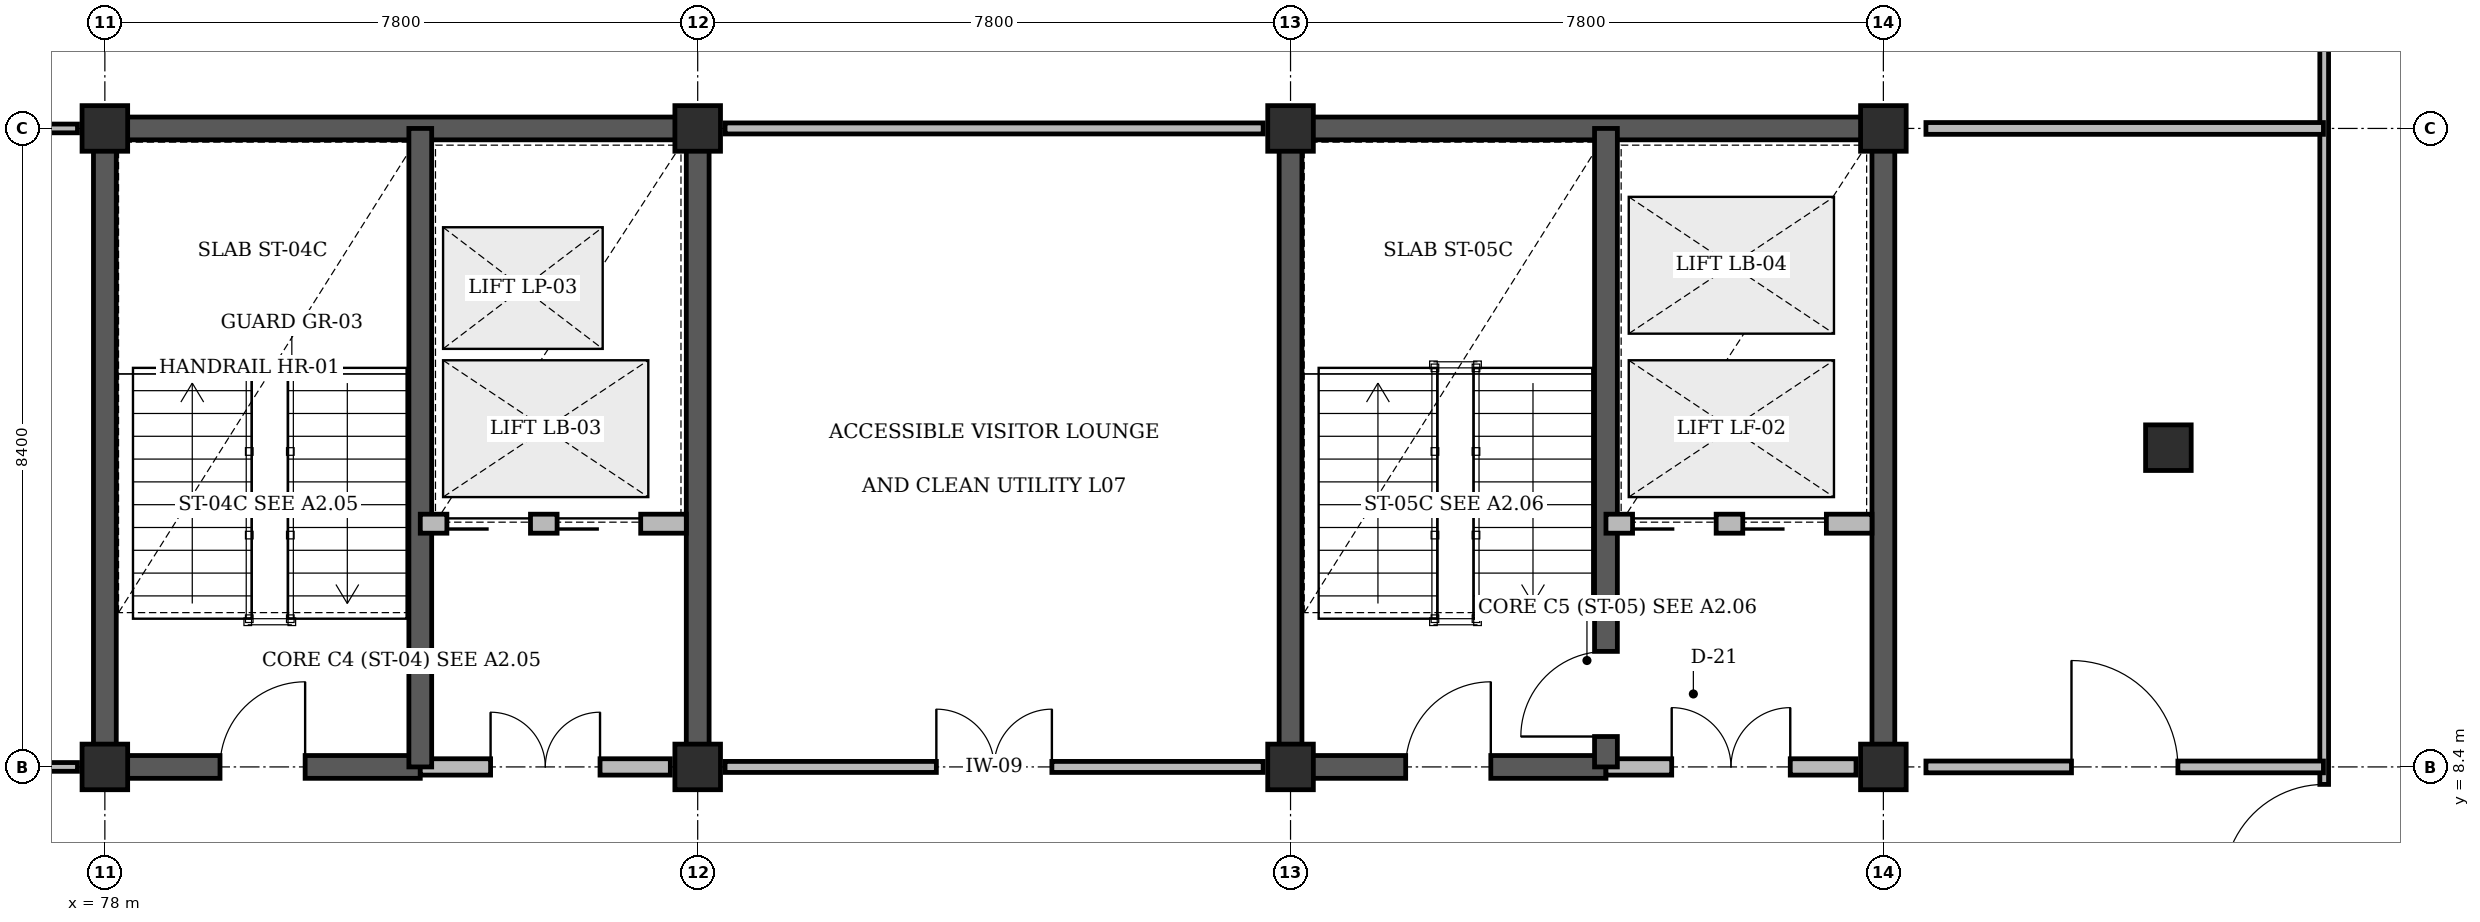
"""IFC4 building model, lengths in metres.
Left out: names, types, materials, properties, quantities, classifications, styles, units other than length and angle.
Written with IfcOpenShell. Run it as: python <this file> out.ifc"""

import sys

from ifc_helpers import new_model, si_unit, direction, frame, frame_2d, origin, origin_2d, place, context, subcontext, project, spatial, rectangle, circle, extrude, element, fill, save


model = new_model("IFC4")
c1 = context("Model", 3, precision=1e-05, world=origin(), true_north=direction((0.0, 1.0)))
c2 = subcontext(c1, "Body", "Model", "MODEL_VIEW")
j1 = project(units=[si_unit("LENGTHUNIT", "METRE"), si_unit("PLANEANGLEUNIT", "RADIAN")], contexts=[c1])
p1 = place(None, origin())
s1 = spatial("IfcSite", under=j1, at=p1, CompositionType="ELEMENT")
p2 = place(p1, origin())
s2 = spatial("IfcBuilding", under=s1, at=p2, CompositionType="ELEMENT")
p3 = place(p2, frame((0.0, 0.0, 30.6)))
s3 = spatial("IfcBuildingStorey", under=s2, at=p3, CompositionType="ELEMENT", Elevation=30.6)
p4 = place(p3, frame((77.85, 16.8, 0.0), z_axis=(0.0, 0.0, 1.0), x_axis=(1.0, 0.0, 0.0)))
e1 = element("IfcWall", 1, at=p4, inside=s3, PredefinedType="SHEAR", context=c2, shape_type="SweptSolid", body=[
    extrude(rectangle(XDim=8.1, YDim=0.3, at=frame_2d((4.05, 0.0))), origin(), (0.0, 0.0, 1.0), 3.92),
])
for number, where, z_axis, x_axis in (
    (2, (78.0, 8.4, 0.0), (0.0, 0.0, 1.0), (0.0, 1.0, 0.0)),
    (3, (85.8, 8.4, 0.0), (0.0, 0.0, 1.0), (0.0, 1.0, 0.0)),
):
    element("IfcWall", number, at=place(p3, frame(where, z_axis=z_axis, x_axis=x_axis)), inside=s3, PredefinedType="SHEAR", context=c2, shape_type="SweptSolid", body=[
        extrude(rectangle(XDim=8.4, YDim=0.3, at=frame_2d((4.2, 0.0))), origin(), (0.0, 0.0, 1.0), 3.92),
    ])
p5 = place(p3, frame((93.45, 16.8, 0.0), z_axis=(0.0, 0.0, 1.0), x_axis=(1.0, 0.0, 0.0)))
e4 = element("IfcWall", 4, at=p5, inside=s3, PredefinedType="SHEAR", context=c2, shape_type="SweptSolid", body=[
    extrude(rectangle(XDim=8.1, YDim=0.3, at=frame_2d((4.05, 0.0))), origin(), (0.0, 0.0, 1.0), 3.92),
])
for number, where, z_axis, x_axis in (
    (5, (93.6, 8.4, 0.0), (0.0, 0.0, 1.0), (0.0, 1.0, 0.0)),
    (6, (101.4, 8.4, 0.0), (0.0, 0.0, 1.0), (0.0, 1.0, 0.0)),
):
    element("IfcWall", number, at=place(p3, frame(where, z_axis=z_axis, x_axis=x_axis)), inside=s3, PredefinedType="SHEAR", context=c2, shape_type="SweptSolid", body=[
        extrude(rectangle(XDim=8.4, YDim=0.3, at=frame_2d((4.2, 0.0))), origin(), (0.0, 0.0, 1.0), 3.92),
    ])
for number, where, z_axis, x_axis in (
    (7, (78.0, 8.4, 0.0), (0.0, 0.0, 1.0), (1.0, 0.0, 0.0)),
    (8, (78.0, 16.8, 0.0), (0.0, 0.0, 1.0), (1.0, 0.0, 0.0)),
    (9, (85.8, 8.4, 0.0), (0.0, 0.0, 1.0), (1.0, 0.0, 0.0)),
    (10, (85.8, 16.8, 0.0), (0.0, 0.0, 1.0), (1.0, 0.0, 0.0)),
    (11, (93.6, 8.4, 0.0), (0.0, 0.0, 1.0), (1.0, 0.0, 0.0)),
    (12, (93.6, 16.8, 0.0), (0.0, 0.0, 1.0), (1.0, 0.0, 0.0)),
    (13, (101.4, 8.4, 0.0), (0.0, 0.0, 1.0), (1.0, 0.0, 0.0)),
    (14, (101.4, 16.8, 0.0), (0.0, 0.0, 1.0), (1.0, 0.0, 0.0)),
):
    element("IfcColumn", number, at=place(p3, frame(where, z_axis=z_axis, x_axis=x_axis)), inside=s3, PredefinedType="COLUMN", context=c2, shape_type="SweptSolid", body=[
        extrude(rectangle(XDim=0.6, YDim=0.6, at=origin_2d()), origin(), (0.0, 0.0, 1.0), 4.2),
    ])
p6 = place(p3, frame((105.15, 12.6, 0.0), z_axis=(0.0, 0.0, 1.0), x_axis=(1.0, 0.0, 0.0)))
e15 = element("IfcColumn", 15, at=p6, inside=s3, PredefinedType="PILASTER", context=c2, shape_type="SweptSolid", body=[
    extrude(circle(Radius=0.3, at=origin_2d()), origin(), (0.0, 0.0, 1.0), 4.2),
])
p7 = place(p3, frame((78.0, 8.4, 0.0), z_axis=(0.0, 0.0, 1.0), x_axis=(1.0, 0.0, 0.0)))
e16 = element("IfcWall", 16, at=p7, inside=s3, PredefinedType="SHEAR", context=c2, shape_type="SweptSolid", body=[
    extrude(rectangle(XDim=4.15, YDim=0.3, at=frame_2d((2.075, 0.0))), origin(), (0.0, 0.0, 1.0), 4.2),
])
p8 = place(p7, frame((1.515, 0.0, 0.0)))
e17 = element("IfcOpeningElement", 17, at=p8, cuts=e16, PredefinedType="OPENING", context=c2, shape_type="SweptSolid", body=[
    extrude(rectangle(XDim=1.12, YDim=2.15, at=frame_2d((0.56, 1.075))), frame((0.0, 0.16, 0.0), z_axis=(0.0, -1.0, 0.0), x_axis=(1.0, 0.0, 0.0)), (0.0, 0.0, 1.0), 0.32),
])
p9 = place(p3, frame((82.15, 8.4, 0.0), z_axis=(0.0, 0.0, 1.0), x_axis=(1.0, 0.0, 0.0)))
e18 = element("IfcWall", 18, at=p9, inside=s3, PredefinedType="STANDARD", context=c2, shape_type="SweptSolid", body=[
    extrude(rectangle(XDim=3.29, YDim=0.215, at=frame_2d((1.645, 0.0))), origin(), (0.0, 0.0, 1.0), 3.305),
])
p10 = place(p9, frame((0.925, 0.0, 0.0)))
e19 = element("IfcOpeningElement", 19, at=p10, cuts=e18, PredefinedType="OPENING", context=c2, shape_type="SweptSolid", body=[
    extrude(rectangle(XDim=1.44, YDim=2.2, at=frame_2d((0.72, 1.1))), frame((0.0, 0.118, 0.0), z_axis=(0.0, -1.0, 0.0), x_axis=(1.0, 0.0, 0.0)), (0.0, 0.0, 1.0), 0.235),
])
p11 = place(p3, frame((82.15, 8.4, 0.0), z_axis=(0.0, 0.0, 1.0), x_axis=(0.0, 1.0, 0.0)))
e20 = element("IfcWall", 20, at=p11, inside=s3, PredefinedType="SHEAR", context=c2, shape_type="SweptSolid", body=[
    extrude(rectangle(XDim=8.4, YDim=0.3, at=frame_2d((4.2, 0.0))), origin(), (0.0, 0.0, 1.0), 4.2),
])
p12 = place(p3, frame((82.15, 11.6, 0.0), z_axis=(0.0, 0.0, 1.0), x_axis=(1.0, 0.0, 0.0)))
e21 = element("IfcWall", 21, at=p12, inside=s3, PredefinedType="STANDARD", context=c2, shape_type="SweptSolid", body=[
    extrude(rectangle(XDim=3.5, YDim=0.25, at=frame_2d((1.75, 0.0))), origin(), (0.0, 0.0, 1.0), 3.9),
])
p13 = place(p12, frame((0.35, 0.0, 0.0)))
e22 = element("IfcOpeningElement", 22, at=p13, cuts=e21, PredefinedType="OPENING", context=c2, shape_type="SweptSolid", body=[
    extrude(rectangle(XDim=1.1, YDim=2.2, at=frame_2d((0.55, 1.1))), frame((0.0, 0.135, 0.0), z_axis=(0.0, -1.0, 0.0), x_axis=(1.0, 0.0, 0.0)), (0.0, 0.0, 1.0), 0.27),
])
p14 = place(p12, frame((1.8, 0.0, 0.0)))
e23 = element("IfcOpeningElement", 23, at=p14, cuts=e21, PredefinedType="OPENING", context=c2, shape_type="SweptSolid", body=[
    extrude(rectangle(XDim=1.1, YDim=2.2, at=frame_2d((0.55, 1.1))), frame((0.0, 0.135, 0.0), z_axis=(0.0, -1.0, 0.0), x_axis=(1.0, 0.0, 0.0)), (0.0, 0.0, 1.0), 0.27),
])
p15 = place(p3, frame((93.6, 8.4, 0.0), z_axis=(0.0, 0.0, 1.0), x_axis=(1.0, 0.0, 0.0)))
e24 = element("IfcWall", 24, at=p15, inside=s3, PredefinedType="SHEAR", context=c2, shape_type="SweptSolid", body=[
    extrude(rectangle(XDim=4.15, YDim=0.3, at=frame_2d((2.075, 0.0))), origin(), (0.0, 0.0, 1.0), 4.2),
])
p16 = place(p15, frame((1.515, 0.0, 0.0)))
e25 = element("IfcOpeningElement", 25, at=p16, cuts=e24, PredefinedType="OPENING", context=c2, shape_type="SweptSolid", body=[
    extrude(rectangle(XDim=1.12, YDim=2.15, at=frame_2d((0.56, 1.075))), frame((0.0, 0.16, 0.0), z_axis=(0.0, -1.0, 0.0), x_axis=(1.0, 0.0, 0.0)), (0.0, 0.0, 1.0), 0.32),
])
p17 = place(p3, frame((97.75, 8.4, 0.0), z_axis=(0.0, 0.0, 1.0), x_axis=(1.0, 0.0, 0.0)))
e26 = element("IfcWall", 26, at=p17, inside=s3, PredefinedType="STANDARD", context=c2, shape_type="SweptSolid", body=[
    extrude(rectangle(XDim=3.29, YDim=0.215, at=frame_2d((1.645, 0.0))), origin(), (0.0, 0.0, 1.0), 3.305),
])
p18 = place(p17, frame((0.865, 0.0, 0.0)))
e27 = element("IfcOpeningElement", 27, at=p18, cuts=e26, PredefinedType="OPENING", context=c2, shape_type="SweptSolid", body=[
    extrude(rectangle(XDim=1.56, YDim=2.2, at=frame_2d((0.78, 1.1))), frame((0.0, 0.118, 0.0), z_axis=(0.0, -1.0, 0.0), x_axis=(1.0, 0.0, 0.0)), (0.0, 0.0, 1.0), 0.235),
])
p19 = place(p3, frame((97.75, 8.4, 0.0), z_axis=(0.0, 0.0, 1.0), x_axis=(0.0, 1.0, 0.0)))
e28 = element("IfcWall", 28, at=p19, inside=s3, PredefinedType="SHEAR", context=c2, shape_type="SweptSolid", body=[
    extrude(rectangle(XDim=8.4, YDim=0.3, at=frame_2d((4.2, 0.0))), origin(), (0.0, 0.0, 1.0), 4.2),
])
p20 = place(p19, frame((0.4, 0.0, 0.0)))
e29 = element("IfcOpeningElement", 29, at=p20, cuts=e28, PredefinedType="OPENING", context=c2, shape_type="SweptSolid", body=[
    extrude(rectangle(XDim=1.12, YDim=2.15, at=frame_2d((0.56, 1.075))), frame((0.0, 0.16, 0.0), z_axis=(0.0, -1.0, 0.0), x_axis=(1.0, 0.0, 0.0)), (0.0, 0.0, 1.0), 0.32),
])
p21 = place(p3, frame((97.75, 11.6, 0.0), z_axis=(0.0, 0.0, 1.0), x_axis=(1.0, 0.0, 0.0)))
e30 = element("IfcWall", 30, at=p21, inside=s3, PredefinedType="STANDARD", context=c2, shape_type="SweptSolid", body=[
    extrude(rectangle(XDim=3.5, YDim=0.25, at=frame_2d((1.75, 0.0))), origin(), (0.0, 0.0, 1.0), 3.9),
])
p22 = place(p21, frame((0.35, 0.0, 0.0)))
e31 = element("IfcOpeningElement", 31, at=p22, cuts=e30, PredefinedType="OPENING", context=c2, shape_type="SweptSolid", body=[
    extrude(rectangle(XDim=1.1, YDim=2.2, at=frame_2d((0.55, 1.1))), frame((0.0, 0.135, 0.0), z_axis=(0.0, -1.0, 0.0), x_axis=(1.0, 0.0, 0.0)), (0.0, 0.0, 1.0), 0.27),
])
p23 = place(p21, frame((1.8, 0.0, 0.0)))
e32 = element("IfcOpeningElement", 32, at=p23, cuts=e30, PredefinedType="OPENING", context=c2, shape_type="SweptSolid", body=[
    extrude(rectangle(XDim=1.1, YDim=2.2, at=frame_2d((0.55, 1.1))), frame((0.0, 0.135, 0.0), z_axis=(0.0, -1.0, 0.0), x_axis=(1.0, 0.0, 0.0)), (0.0, 0.0, 1.0), 0.27),
])
p24 = place(p3, frame((107.2, 6.0, 0.0), z_axis=(0.0, 0.0, 1.0), x_axis=(0.0, 1.0, 0.0)))
e33 = element("IfcWall", 33, at=p24, inside=s3, PredefinedType="PARTITIONING", context=c2, shape_type="SweptSolid", body=[
    extrude(rectangle(XDim=13.2, YDim=0.115, at=frame_2d((6.6, 0.0))), origin(), (0.0, 0.0, 1.0), 3.9),
])
p25 = place(p24, frame((0.85, 0.0, 0.0)))
e34 = element("IfcOpeningElement", 34, at=p25, cuts=e33, PredefinedType="OPENING", context=c2, shape_type="SweptSolid", body=[
    extrude(rectangle(XDim=1.32, YDim=2.15, at=frame_2d((0.66, 1.075))), frame((0.0, 0.067, 0.0), z_axis=(0.0, -1.0, 0.0), x_axis=(1.0, 0.0, 0.0)), (0.0, 0.0, 1.0), 0.135),
])
for number, where, z_axis, x_axis in (
    (35, (73.2, 8.4, 0.0), (0.0, 0.0, 1.0), (1.0, 0.0, 0.0)),
    (36, (73.2, 16.8, 0.0), (0.0, 0.0, 1.0), (1.0, 0.0, 0.0)),
):
    element("IfcWall", number, at=place(p3, frame(where, z_axis=z_axis, x_axis=x_axis)), inside=s3, PredefinedType="PARTITIONING", context=c2, shape_type="SweptSolid", body=[
        extrude(rectangle(XDim=4.44, YDim=0.115, at=frame_2d((2.22, 0.0))), origin(), (0.0, 0.0, 1.0), 3.305),
    ])
p26 = place(p3, frame((86.16, 8.4, 0.0), z_axis=(0.0, 0.0, 1.0), x_axis=(1.0, 0.0, 0.0)))
e37 = element("IfcWall", 37, at=p26, inside=s3, PredefinedType="PARTITIONING", context=c2, shape_type="SweptSolid", body=[
    extrude(rectangle(XDim=7.08, YDim=0.145, at=frame_2d((3.54, 0.0))), origin(), (0.0, 0.0, 1.0), 3.305),
])
p27 = place(p26, frame((2.78, 0.0, 0.0)))
e38 = element("IfcOpeningElement", 38, at=p27, cuts=e37, PredefinedType="OPENING", context=c2, shape_type="SweptSolid", body=[
    extrude(rectangle(XDim=1.52, YDim=2.2, at=frame_2d((0.76, 1.1))), frame((0.0, 0.083, 0.0), z_axis=(0.0, -1.0, 0.0), x_axis=(1.0, 0.0, 0.0)), (0.0, 0.0, 1.0), 0.165),
])
p28 = place(p3, frame((86.16, 16.8, 0.0), z_axis=(0.0, 0.0, 1.0), x_axis=(1.0, 0.0, 0.0)))
e39 = element("IfcWall", 39, at=p28, inside=s3, PredefinedType="PARTITIONING", context=c2, shape_type="SweptSolid", body=[
    extrude(rectangle(XDim=7.08, YDim=0.145, at=frame_2d((3.54, 0.0))), origin(), (0.0, 0.0, 1.0), 3.305),
])
p29 = place(p3, frame((101.96, 8.4, 0.0), z_axis=(0.0, 0.0, 1.0), x_axis=(1.0, 0.0, 0.0)))
e40 = element("IfcWall", 40, at=p29, inside=s3, PredefinedType="PARTITIONING", context=c2, shape_type="SweptSolid", body=[
    extrude(rectangle(XDim=5.23, YDim=0.155, at=frame_2d((2.615, 0.0))), origin(), (0.0, 0.0, 1.0), 3.305),
])
p30 = place(p29, frame((1.915, 0.0, 0.0)))
e41 = element("IfcOpeningElement", 41, at=p30, cuts=e40, PredefinedType="OPENING", context=c2, shape_type="SweptSolid", body=[
    extrude(rectangle(XDim=1.4, YDim=2.2, at=frame_2d((0.7, 1.1))), frame((0.0, 0.087, 0.0), z_axis=(0.0, -1.0, 0.0), x_axis=(1.0, 0.0, 0.0)), (0.0, 0.0, 1.0), 0.175),
])
p31 = place(p3, frame((101.96, 16.8, 0.0), z_axis=(0.0, 0.0, 1.0), x_axis=(1.0, 0.0, 0.0)))
e42 = element("IfcWall", 42, at=p31, inside=s3, PredefinedType="PARTITIONING", context=c2, shape_type="SweptSolid", body=[
    extrude(rectangle(XDim=5.23, YDim=0.155, at=frame_2d((2.615, 0.0))), origin(), (0.0, 0.0, 1.0), 3.305),
])
p32 = place(p8, origin())
e43 = element("IfcDoor", 43, at=p32, inside=s3, OperationType="SINGLE_SWING_RIGHT", PredefinedType="DOOR", context=c2, shape_type="SweptSolid", body=[
    extrude(rectangle(XDim=1.12, YDim=2.15, at=frame_2d((0.56, 1.075))), frame((0.0, 0.025, 0.0), z_axis=(0.0, -1.0, 0.0), x_axis=(1.0, 0.0, 0.0)), (0.0, 0.0, 1.0), 0.05),
])
fill(e17, e43)
p33 = place(p10, origin())
e44 = element("IfcDoor", 44, at=p33, inside=s3, OperationType="DOUBLE_DOOR_SINGLE_SWING", PredefinedType="DOOR", context=c2, shape_type="SweptSolid", body=[
    extrude(rectangle(XDim=1.44, YDim=2.2, at=frame_2d((0.72, 1.1))), frame((0.0, 0.025, 0.0), z_axis=(0.0, -1.0, 0.0), x_axis=(1.0, 0.0, 0.0)), (0.0, 0.0, 1.0), 0.05),
])
fill(e19, e44)
p34 = place(p13, origin())
e45 = element("IfcDoor", 45, at=p34, inside=s3, OperationType="SLIDING_TO_LEFT", PredefinedType="DOOR", context=c2, shape_type="SweptSolid", body=[
    extrude(rectangle(XDim=1.1, YDim=2.2, at=frame_2d((0.55, 1.1))), frame((0.0, 0.025, 0.0), z_axis=(0.0, -1.0, 0.0), x_axis=(1.0, 0.0, 0.0)), (0.0, 0.0, 1.0), 0.05),
])
fill(e22, e45)
p35 = place(p14, origin())
e46 = element("IfcDoor", 46, at=p35, inside=s3, OperationType="SLIDING_TO_LEFT", PredefinedType="DOOR", context=c2, shape_type="SweptSolid", body=[
    extrude(rectangle(XDim=1.1, YDim=2.2, at=frame_2d((0.55, 1.1))), frame((0.0, 0.025, 0.0), z_axis=(0.0, -1.0, 0.0), x_axis=(1.0, 0.0, 0.0)), (0.0, 0.0, 1.0), 0.05),
])
fill(e23, e46)
p36 = place(p16, origin())
e47 = element("IfcDoor", 47, at=p36, inside=s3, OperationType="SINGLE_SWING_RIGHT", PredefinedType="DOOR", context=c2, shape_type="SweptSolid", body=[
    extrude(rectangle(XDim=1.12, YDim=2.15, at=frame_2d((0.56, 1.075))), frame((0.0, 0.025, 0.0), z_axis=(0.0, -1.0, 0.0), x_axis=(1.0, 0.0, 0.0)), (0.0, 0.0, 1.0), 0.05),
])
fill(e25, e47)
p37 = place(p18, origin())
e48 = element("IfcDoor", 48, at=p37, inside=s3, OperationType="DOUBLE_DOOR_SINGLE_SWING", PredefinedType="DOOR", context=c2, shape_type="SweptSolid", body=[
    extrude(rectangle(XDim=1.56, YDim=2.2, at=frame_2d((0.78, 1.1))), frame((0.0, 0.025, 0.0), z_axis=(0.0, -1.0, 0.0), x_axis=(1.0, 0.0, 0.0)), (0.0, 0.0, 1.0), 0.05),
])
fill(e27, e48)
p38 = place(p20, origin())
e49 = element("IfcDoor", 49, at=p38, inside=s3, OperationType="SINGLE_SWING_LEFT", PredefinedType="DOOR", context=c2, shape_type="SweptSolid", body=[
    extrude(rectangle(XDim=1.12, YDim=2.15, at=frame_2d((0.56, 1.075))), frame((0.0, 0.025, 0.0), z_axis=(0.0, -1.0, 0.0), x_axis=(1.0, 0.0, 0.0)), (0.0, 0.0, 1.0), 0.05),
])
fill(e29, e49)
p39 = place(p22, origin())
e50 = element("IfcDoor", 50, at=p39, inside=s3, OperationType="SLIDING_TO_LEFT", PredefinedType="DOOR", context=c2, shape_type="SweptSolid", body=[
    extrude(rectangle(XDim=1.1, YDim=2.2, at=frame_2d((0.55, 1.1))), frame((0.0, 0.025, 0.0), z_axis=(0.0, -1.0, 0.0), x_axis=(1.0, 0.0, 0.0)), (0.0, 0.0, 1.0), 0.05),
])
fill(e31, e50)
p40 = place(p23, origin())
e51 = element("IfcDoor", 51, at=p40, inside=s3, OperationType="SLIDING_TO_LEFT", PredefinedType="DOOR", context=c2, shape_type="SweptSolid", body=[
    extrude(rectangle(XDim=1.1, YDim=2.2, at=frame_2d((0.55, 1.1))), frame((0.0, 0.025, 0.0), z_axis=(0.0, -1.0, 0.0), x_axis=(1.0, 0.0, 0.0)), (0.0, 0.0, 1.0), 0.05),
])
fill(e32, e51)
p41 = place(p25, origin())
e52 = element("IfcDoor", 52, at=p41, inside=s3, OperationType="SINGLE_SWING_LEFT", PredefinedType="DOOR", context=c2, shape_type="SweptSolid", body=[
    extrude(rectangle(XDim=1.32, YDim=2.15, at=frame_2d((0.66, 1.075))), frame((0.0, 0.025, 0.0), z_axis=(0.0, -1.0, 0.0), x_axis=(1.0, 0.0, 0.0)), (0.0, 0.0, 1.0), 0.05),
])
fill(e34, e52)
p42 = place(p27, origin())
e53 = element("IfcDoor", 53, at=p42, inside=s3, OperationType="DOUBLE_DOOR_SINGLE_SWING", PredefinedType="DOOR", context=c2, shape_type="SweptSolid", body=[
    extrude(rectangle(XDim=1.52, YDim=2.2, at=frame_2d((0.76, 1.1))), frame((0.0, 0.025, 0.0), z_axis=(0.0, -1.0, 0.0), x_axis=(1.0, 0.0, 0.0)), (0.0, 0.0, 1.0), 0.05),
])
fill(e38, e53)
p43 = place(p30, origin())
e54 = element("IfcDoor", 54, at=p43, inside=s3, OperationType="SINGLE_SWING_LEFT", PredefinedType="DOOR", context=c2, shape_type="SweptSolid", body=[
    extrude(rectangle(XDim=1.4, YDim=2.2, at=frame_2d((0.7, 1.1))), frame((0.0, 0.025, 0.0), z_axis=(0.0, -1.0, 0.0), x_axis=(1.0, 0.0, 0.0)), (0.0, 0.0, 1.0), 0.05),
])
fill(e41, e54)
save(model, sys.argv[1])
